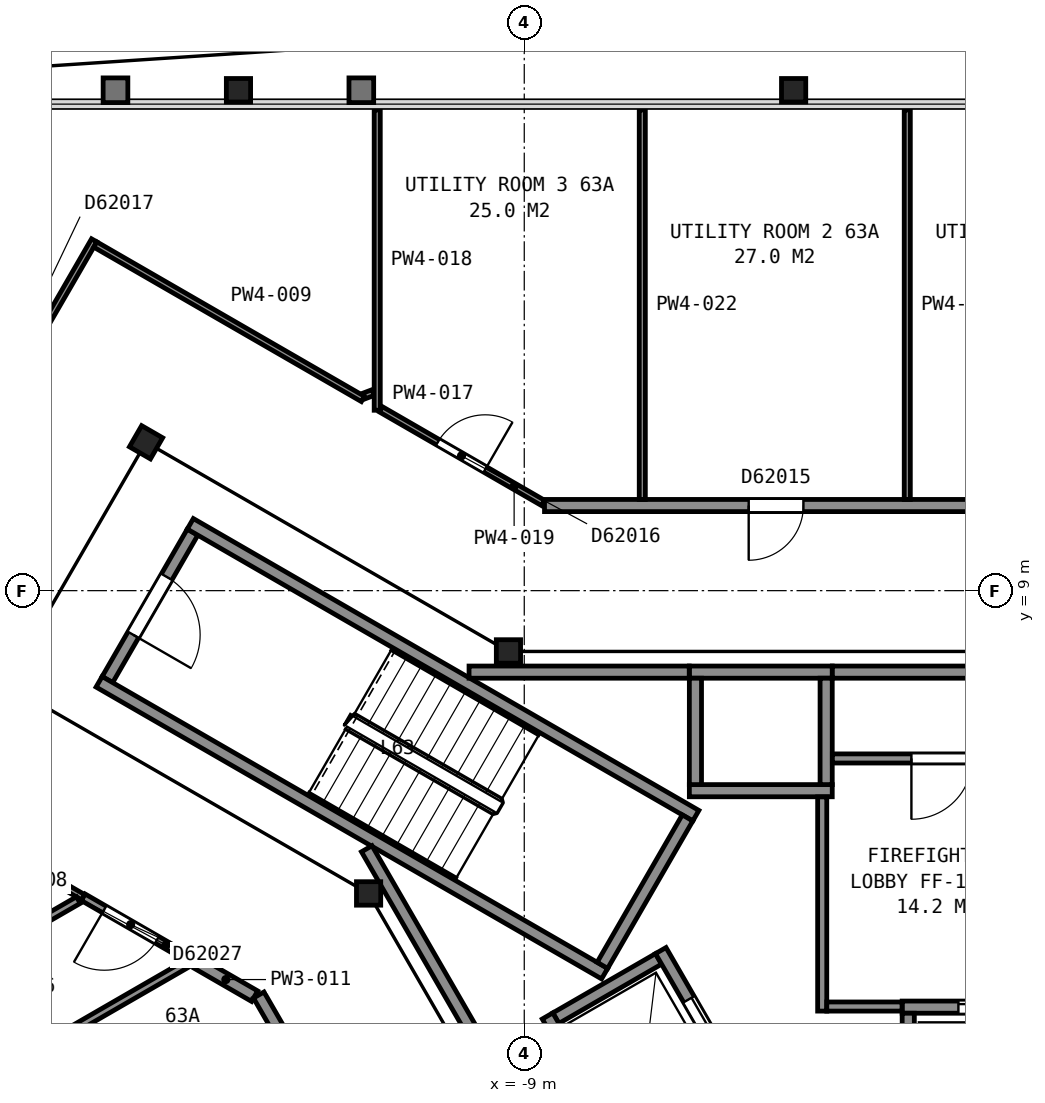
"""IFC4 building model, lengths in metres.
Left out: names, types, materials, properties, quantities, classifications, styles, units other than length and angle.
Written with IfcOpenShell. Run it as: python <this file> out.ifc"""

import sys

from ifc_helpers import new_model, si_unit, direction, frame, frame_2d, origin, origin_2d, place, context, subcontext, project, spatial, rectangle, i_section, extrude, element, fill, save


model = new_model("IFC4")
c1 = context("Model", 3, precision=1e-05, world=origin(), true_north=direction((0.0, 1.0)))
c2 = subcontext(c1, "Body", "Model", "MODEL_VIEW")
j1 = project(units=[si_unit("LENGTHUNIT", "METRE"), si_unit("PLANEANGLEUNIT", "RADIAN")], contexts=[c1])
p1 = place(None, origin())
s1 = spatial("IfcSite", under=j1, at=p1, CompositionType="ELEMENT")
p2 = place(p1, origin())
s2 = spatial("IfcBuilding", under=s1, at=p2, CompositionType="ELEMENT")
p3 = place(p2, frame((0.0, 0.0, 250.8)))
s3 = spatial("IfcBuildingStorey", under=s2, at=p3, CompositionType="ELEMENT", Elevation=250.8)
for number, where, z_axis, x_axis in (
    (1, (-4.57, 17.23, 0.0), (0.0, 0.0, 1.0), (1.0, 0.0, 0.0)),
    (2, (-13.7, 17.23, 0.0), (0.0, 0.0, 1.0), (1.0, 0.0, 0.0)),
    (3, (-9.26, 8.0, 0.0), (0.0, 0.0, 1.0), (1.0, 0.0, 0.0)),
):
    element("IfcColumn", number, at=place(p3, frame(where, z_axis=z_axis, x_axis=x_axis)), inside=s3, PredefinedType="COLUMN", context=c2, shape_type="SweptSolid", body=[
        extrude(i_section(OverallWidth=0.399, OverallDepth=0.386, WebThickness=0.021, FlangeThickness=0.033, FilletRadius=0.015, at=origin_2d()), origin(), (0.0, 0.0, 1.0), 3.7),
    ])
p4 = place(p3, frame((-15.22, 11.44, 0.0), z_axis=(0.0, 0.0, 1.0), x_axis=(0.5, 0.866025403784, 0.0)))
e4 = element("IfcColumn", 4, at=p4, inside=s3, PredefinedType="COLUMN", context=c2, shape_type="SweptSolid", body=[
    extrude(i_section(OverallWidth=0.401, OverallDepth=0.399, WebThickness=0.025, FlangeThickness=0.04, FilletRadius=0.015, at=origin_2d()), origin(), (0.0, 0.0, 1.0), 3.7),
])
p5 = place(p3, frame((-11.56, 4.02, 0.0), z_axis=(0.0, 0.0, 1.0), x_axis=(1.0, 0.0, 0.0)))
e5 = element("IfcColumn", 5, at=p5, inside=s3, PredefinedType="COLUMN", context=c2, shape_type="SweptSolid", body=[
    extrude(i_section(OverallWidth=0.399, OverallDepth=0.386, WebThickness=0.021, FlangeThickness=0.033, FilletRadius=0.015, at=origin_2d()), origin(), (0.0, 0.0, 1.0), 3.7),
])
p6 = place(p3, frame((-14.455, 9.962, 0.0), z_axis=(0.0, 0.0, 1.0), x_axis=(-0.500049511043, -0.865996816683, 0.0)))
e6 = element("IfcWall", 6, at=p6, inside=s3, PredefinedType="PARTITIONING", context=c2, shape_type="SweptSolid", body=[
    extrude(rectangle(XDim=2.8, YDim=0.2, at=frame_2d((1.4, 0.0))), origin(), (0.0, 0.0, 1.0), 3.45),
])
p7 = place(p6, frame((0.85, 0.0, 0.0)))
e7 = element("IfcOpeningElement", 7, at=p7, cuts=e6, PredefinedType="OPENING", context=c2, shape_type="SweptSolid", body=[
    extrude(rectangle(XDim=1.1, YDim=2.1, at=frame_2d((0.55, 1.05))), frame((0.0, 0.11, 0.0), z_axis=(0.0, -1.0, 0.0), x_axis=(1.0, 0.0, 0.0)), (0.0, 0.0, 1.0), 0.22),
])
for number, where, z_axis, x_axis in (
    (8, (-7.678, 2.701, 0.0), (0.0, 0.0, 1.0), (-0.866, 0.5, 0.0)),
    (9, (-6.178, 5.299, 0.0), (0.0, 0.0, 1.0), (-0.866, 0.5, 0.0)),
):
    element("IfcWall", number, at=place(p3, frame(where, z_axis=z_axis, x_axis=x_axis)), inside=s3, PredefinedType="PARTITIONING", context=c2, shape_type="SweptSolid", body=[
        extrude(rectangle(XDim=9.6, YDim=0.2, at=frame_2d((4.8, 0.0))), origin(), (0.0, 0.0, 1.0), 3.45),
    ])
p8 = place(p3, frame((-6.315, 5.262, 0.0), z_axis=(0.0, 0.0, 1.0), x_axis=(-0.500049511043, -0.865996816683, 0.0)))
e10 = element("IfcWall", 10, at=p8, inside=s3, PredefinedType="PARTITIONING", context=c2, shape_type="SweptSolid", body=[
    extrude(rectangle(XDim=2.8, YDim=0.2, at=frame_2d((1.4, 0.0))), origin(), (0.0, 0.0, 1.0), 3.45),
])
p9 = place(p3, frame((-2.785, 2.15, 0.0), z_axis=(0.0, 0.0, 1.0), x_axis=(1.0, 0.0, 0.0)))
e11 = element("IfcWall", 11, at=p9, inside=s3, PredefinedType="PARTITIONING", context=c2, shape_type="SweptSolid", body=[
    extrude(rectangle(XDim=2.95, YDim=0.2, at=frame_2d((1.475, 0.0))), origin(), (0.0, 0.0, 1.0), 3.7),
])
p10 = place(p9, frame((0.925, 0.0, 0.0)))
e12 = element("IfcOpeningElement", 12, at=p10, cuts=e11, PredefinedType="OPENING", context=c2, shape_type="SweptSolid", body=[
    extrude(rectangle(XDim=1.1, YDim=2.1, at=frame_2d((0.55, 1.05))), frame((0.0, 0.11, 0.0), z_axis=(0.0, -1.0, 0.0), x_axis=(1.0, 0.0, 0.0)), (0.0, 0.0, 1.0), 0.22),
])
for number, where, z_axis, x_axis in (
    (13, (-6.285, 5.71, 0.0), (0.0, 0.0, 1.0), (1.0, 0.0, 0.0)),
    (14, (-6.285, 7.66, 0.0), (0.0, 0.0, 1.0), (1.0, 0.0, 0.0)),
):
    element("IfcWall", number, at=place(p3, frame(where, z_axis=z_axis, x_axis=x_axis)), inside=s3, PredefinedType="PARTITIONING", context=c2, shape_type="SweptSolid", body=[
        extrude(rectangle(XDim=2.35, YDim=0.2, at=frame_2d((1.175, 0.0))), origin(), (0.0, 0.0, 1.0), 3.7),
    ])
for number, where, z_axis, x_axis in (
    (15, (-8.48, 1.969, 0.0), (0.0, 0.0, 1.0), (0.866, 0.5, 0.0)),
    (16, (-2.685, 0.1, 0.0), (0.0, 0.0, 1.0), (0.0, 1.0, 0.0)),
):
    element("IfcWall", number, at=place(p3, frame(where, z_axis=z_axis, x_axis=x_axis)), inside=s3, PredefinedType="PARTITIONING", context=c2, shape_type="SweptSolid", body=[
        extrude(rectangle(XDim=1.95, YDim=0.2, at=frame_2d((0.975, 0.0))), origin(), (0.0, 0.0, 1.0), 3.7),
    ])
for number, where, z_axis, x_axis in (
    (17, (-4.035, 5.81, 0.0), (0.0, 0.0, 1.0), (0.0, 1.0, 0.0)),
    (18, (-6.185, 5.81, 0.0), (0.0, 0.0, 1.0), (0.0, 1.0, 0.0)),
):
    element("IfcWall", number, at=place(p3, frame(where, z_axis=z_axis, x_axis=x_axis)), inside=s3, PredefinedType="PARTITIONING", context=c2, shape_type="SweptSolid", body=[
        extrude(rectangle(XDim=1.75, YDim=0.2, at=frame_2d((0.875, 0.0))), origin(), (0.0, 0.0, 1.0), 3.7),
    ])
p11 = place(p3, frame((-5.28, 0.525, 0.0), z_axis=(0.0, 0.0, 1.0), x_axis=(-0.500037662692, 0.866003658127, 0.0)))
e19 = element("IfcWall", 19, at=p11, inside=s3, PredefinedType="PARTITIONING", context=c2, shape_type="SweptSolid", body=[
    extrude(rectangle(XDim=2.95, YDim=0.2, at=frame_2d((1.475, 0.0))), origin(), (0.0, 0.0, 1.0), 3.7),
])
p12 = place(p11, frame((0.925, 0.0, 0.0)))
e20 = element("IfcOpeningElement", 20, at=p12, cuts=e19, PredefinedType="OPENING", context=c2, shape_type="SweptSolid", body=[
    extrude(rectangle(XDim=1.1, YDim=2.1, at=frame_2d((0.55, 1.05))), frame((0.0, 0.11, 0.0), z_axis=(0.0, -1.0, 0.0), x_axis=(1.0, 0.0, 0.0)), (0.0, 0.0, 1.0), 0.22),
])
p13 = place(p3, frame((-7.242, -0.376, 0.0), z_axis=(0.0, 0.0, 1.0), x_axis=(-0.499996545922, 0.866027397988, 0.0)))
e21 = element("IfcWall", 21, at=p13, inside=s3, PredefinedType="PARTITIONING", context=c2, shape_type="SweptSolid", body=[
    extrude(rectangle(XDim=2.75, YDim=0.2, at=frame_2d((1.375, 0.0))), origin(), (0.0, 0.0, 1.0), 3.7),
])
p14 = place(p3, frame((-11.591, 4.755, 0.0), z_axis=(0.0, 0.0, 1.0), x_axis=(0.500043977787, -0.866000011708, 0.0)))
e22 = element("IfcWall", 22, at=p14, inside=s3, PredefinedType="PARTITIONING", context=c2, shape_type="SweptSolid", body=[
    extrude(rectangle(XDim=6.617, YDim=0.2, at=frame_2d((3.308, 0.0))), origin(), (0.0, 0.0, 1.0), 3.45),
])
p15 = place(p14, frame((3.695, 0.0, 0.0)))
e23 = element("IfcOpeningElement", 23, at=p15, cuts=e22, PredefinedType="OPENING", context=c2, shape_type="SweptSolid", body=[
    extrude(rectangle(XDim=1.8, YDim=2.1, at=frame_2d((0.9, 1.05))), frame((0.0, 0.11, 0.0), z_axis=(0.0, -1.0, 0.0), x_axis=(1.0, 0.0, 0.0)), (0.0, 0.0, 1.0), 0.22),
])
p16 = place(p3, frame((-9.908, 7.66, 0.0), z_axis=(0.0, 0.0, 1.0), x_axis=(1.0, 0.0, 0.0)))
e24 = element("IfcWall", 24, at=p16, inside=s3, PredefinedType="PARTITIONING", context=c2, shape_type="SweptSolid", body=[
    extrude(rectangle(XDim=3.621, YDim=0.2, at=frame_2d((1.811, 0.0))), origin(), (0.0, 0.0, 1.0), 3.45),
])
p17 = place(p3, frame((-4.1, 2.085, 0.0), z_axis=(0.0, 0.0, 1.0), x_axis=(0.0, 1.0, 0.0)))
e25 = element("IfcWall", 25, at=p17, inside=s3, PredefinedType="PARTITIONING", context=c2, shape_type="SweptSolid", body=[
    extrude(rectangle(XDim=3.523, YDim=0.15, at=frame_2d((1.761, 0.0))), origin(), (0.0, 0.0, 1.0), 3.45),
])
p18 = place(p3, frame((-4.025, 2.16, 0.0), z_axis=(0.0, 0.0, 1.0), x_axis=(1.0, 0.0, 0.0)))
e26 = element("IfcWall", 26, at=p18, inside=s3, PredefinedType="PARTITIONING", context=c2, shape_type="SweptSolid", body=[
    extrude(rectangle(XDim=1.238, YDim=0.15, at=frame_2d((0.619, 0.0))), origin(), (0.0, 0.0, 1.0), 3.45),
])
p19 = place(p3, frame((-3.933, 6.24, 0.0), z_axis=(0.0, 0.0, 1.0), x_axis=(1.0, 0.0, 0.0)))
e27 = element("IfcWall", 27, at=p19, inside=s3, PredefinedType="PARTITIONING", context=c2, shape_type="SweptSolid", body=[
    extrude(rectangle(XDim=3.538, YDim=0.15, at=frame_2d((1.769, 0.0))), origin(), (0.0, 0.0, 1.0), 3.45),
])
p20 = place(p19, frame((1.3, 0.0, 0.0)))
e28 = element("IfcOpeningElement", 28, at=p20, cuts=e27, PredefinedType="OPENING", context=c2, shape_type="SweptSolid", body=[
    extrude(rectangle(XDim=1.0, YDim=2.1, at=frame_2d((0.5, 1.05))), frame((0.0, 0.085, 0.0), z_axis=(0.0, -1.0, 0.0), x_axis=(1.0, 0.0, 0.0)), (0.0, 0.0, 1.0), 0.17),
])
p21 = place(p3, frame((-3.933, 7.66, 0.0), z_axis=(0.0, 0.0, 1.0), x_axis=(1.0, 0.0, 0.0)))
e29 = element("IfcWall", 29, at=p21, inside=s3, PredefinedType="PARTITIONING", context=c2, shape_type="SweptSolid", body=[
    extrude(rectangle(XDim=13.841, YDim=0.2, at=frame_2d((6.92, 0.0))), origin(), (0.0, 0.0, 1.0), 3.45),
])
p22 = place(p3, frame((-16.253, 3.957, 0.0), z_axis=(0.0, 0.0, 1.0), x_axis=(-0.866006514596, 0.500032715607, 0.0)))
e30 = element("IfcWall", 30, at=p22, inside=s3, PredefinedType="PARTITIONING", context=c2, shape_type="SweptSolid", body=[
    extrude(rectangle(XDim=5.199, YDim=0.1, at=frame_2d((2.6, 0.0))), origin(), (0.0, 0.0, 1.0), 2.713),
])
p23 = place(p22, frame((1.978, 0.0, 0.0)))
e31 = element("IfcOpeningElement", 31, at=p23, cuts=e30, PredefinedType="OPENING", context=c2, shape_type="SweptSolid", body=[
    extrude(rectangle(XDim=0.9, YDim=2.1, at=frame_2d((0.45, 1.05))), frame((0.0, 0.06, 0.0), z_axis=(0.0, -1.0, 0.0), x_axis=(1.0, 0.0, 0.0)), (0.0, 0.0, 1.0), 0.12),
])
p24 = place(p3, frame((-20.824, 6.539, 0.0), z_axis=(0.0, 0.0, 1.0), x_axis=(0.500297300687, 0.865853689098, 0.0)))
e32 = element("IfcWall", 32, at=p24, inside=s3, PredefinedType="PARTITIONING", context=c2, shape_type="SweptSolid", body=[
    extrude(rectangle(XDim=9.496, YDim=0.1, at=frame_2d((4.748, 0.0))), origin(), (0.0, 0.0, 1.0), 2.713),
])
p25 = place(p24, frame((4.3, 0.0, 0.0)))
e33 = element("IfcOpeningElement", 33, at=p25, cuts=e32, PredefinedType="OPENING", context=c2, shape_type="SweptSolid", body=[
    extrude(rectangle(XDim=0.9, YDim=2.1, at=frame_2d((0.45, 1.05))), frame((0.0, 0.06, 0.0), z_axis=(0.0, -1.0, 0.0), x_axis=(1.0, 0.0, 0.0)), (0.0, 0.0, 1.0), 0.12),
])
p26 = place(p3, frame((-20.418, 1.553, 0.0), z_axis=(0.0, 0.0, 1.0), x_axis=(0.8660976733, 0.49987480463, 0.0)))
e34 = element("IfcWall", 34, at=p26, inside=s3, PredefinedType="PARTITIONING", context=c2, shape_type="SweptSolid", body=[
    extrude(rectangle(XDim=4.717, YDim=0.125, at=frame_2d((2.358, 0.0))), origin(), (0.0, 0.0, 1.0), 2.713),
])
p27 = place(p3, frame((-19.518, -0.006, 0.0), z_axis=(0.0, 0.0, 1.0), x_axis=(0.866072118736, 0.499919078599, 0.0)))
e35 = element("IfcWall", 35, at=p27, inside=s3, PredefinedType="PARTITIONING", context=c2, shape_type="SweptSolid", body=[
    extrude(rectangle(XDim=5.912, YDim=0.125, at=frame_2d((2.956, 0.0))), origin(), (0.0, 0.0, 1.0), 2.713),
])
p28 = place(p3, frame((-16.253, 3.957, 0.0), z_axis=(0.0, 0.0, 1.0), x_axis=(0.866173232673, -0.499743865396, 0.0)))
e36 = element("IfcWall", 36, at=p28, inside=s3, PredefinedType="PARTITIONING", context=c2, shape_type="SweptSolid", body=[
    extrude(rectangle(XDim=1.974, YDim=0.125, at=frame_2d((0.987, 0.0))), origin(), (0.0, 0.0, 1.0), 2.713),
])
p29 = place(p28, frame((0.4, 0.0, 0.0)))
e37 = element("IfcOpeningElement", 37, at=p29, cuts=e36, PredefinedType="OPENING", context=c2, shape_type="SweptSolid", body=[
    extrude(rectangle(XDim=1.0, YDim=2.1, at=frame_2d((0.5, 1.05))), frame((0.0, 0.073, 0.0), z_axis=(0.0, -1.0, 0.0), x_axis=(1.0, 0.0, 0.0)), (0.0, 0.0, 1.0), 0.145),
])
p30 = place(p3, frame((-16.055, 14.693, 0.0), z_axis=(0.0, 0.0, 1.0), x_axis=(0.866094383736, -0.499880504182, 0.0)))
e38 = element("IfcWall", 38, at=p30, inside=s3, PredefinedType="PARTITIONING", context=c2, shape_type="SweptSolid", body=[
    extrude(rectangle(XDim=5.081, YDim=0.1, at=frame_2d((2.541, 0.0))), origin(), (0.0, 0.0, 1.0), 2.713),
])
p31 = place(p3, frame((-14.381, 2.877, 0.0), z_axis=(0.0, 0.0, 1.0), x_axis=(0.866215333661, -0.499670887416, 0.0)))
e39 = element("IfcWall", 39, at=p31, inside=s3, PredefinedType="PARTITIONING", context=c2, shape_type="SweptSolid", body=[
    extrude(rectangle(XDim=1.093, YDim=0.2, at=frame_2d((0.546, 0.0))), origin(), (0.0, 0.0, 1.0), 2.713),
])
p32 = place(p3, frame((-4.675, -12.706, 0.0), z_axis=(0.0, 0.0, 1.0), x_axis=(-0.499972470324, 0.866041297467, 0.0)))
e40 = element("IfcWall", 40, at=p32, inside=s3, PredefinedType="PARTITIONING", context=c2, shape_type="SweptSolid", body=[
    extrude(rectangle(XDim=17.385, YDim=0.2, at=frame_2d((8.692, 0.0))), origin(), (0.0, 0.0, 1.0), 2.713),
])
p33 = place(p32, frame((14.57, 0.0, 0.0)))
e41 = element("IfcOpeningElement", 41, at=p33, cuts=e40, PredefinedType="OPENING", context=c2, shape_type="SweptSolid", body=[
    extrude(rectangle(XDim=0.9, YDim=2.1, at=frame_2d((0.45, 1.05))), frame((0.0, 0.11, 0.0), z_axis=(0.0, -1.0, 0.0), x_axis=(1.0, 0.0, 0.0)), (0.0, 0.0, 1.0), 0.22),
])
p34 = place(p32, frame((11.777, 0.0, 0.0)))
e42 = element("IfcOpeningElement", 42, at=p34, cuts=e40, PredefinedType="OPENING", context=c2, shape_type="SweptSolid", body=[
    extrude(rectangle(XDim=0.9, YDim=2.1, at=frame_2d((0.45, 1.05))), frame((0.0, 0.11, 0.0), z_axis=(0.0, -1.0, 0.0), x_axis=(1.0, 0.0, 0.0)), (0.0, 0.0, 1.0), 0.22),
])
p35 = place(p32, frame((5.095, 0.0, 0.0)))
e43 = element("IfcOpeningElement", 43, at=p35, cuts=e40, PredefinedType="OPENING", context=c2, shape_type="SweptSolid", body=[
    extrude(rectangle(XDim=0.9, YDim=2.1, at=frame_2d((0.45, 1.05))), frame((0.0, 0.11, 0.0), z_axis=(0.0, -1.0, 0.0), x_axis=(1.0, 0.0, 0.0)), (0.0, 0.0, 1.0), 0.22),
])
p36 = place(p3, frame((-11.632, 12.203, 0.0), z_axis=(0.0, 0.0, 1.0), x_axis=(0.934710776834, 0.355409290354, 0.0)))
e44 = element("IfcWall", 44, at=p36, inside=s3, PredefinedType="PARTITIONING", context=c2, shape_type="SweptSolid", body=[
    extrude(rectangle(XDim=0.156, YDim=0.1, at=frame_2d((0.078, 0.0))), origin(), (0.0, 0.0, 1.0), 2.713),
])
p37 = place(p3, frame((-11.418, 11.967, 0.0), z_axis=(0.0, 0.0, 1.0), x_axis=(0.0, 1.0, 0.0)))
e45 = element("IfcWall", 45, at=p37, inside=s3, PredefinedType="PARTITIONING", context=c2, shape_type="SweptSolid", body=[
    extrude(rectangle(XDim=4.939, YDim=0.1, at=frame_2d((2.469, 0.0))), origin(), (0.0, 0.0, 1.0), 2.713),
])
p38 = place(p3, frame((-11.357, 11.982, 0.0), z_axis=(0.0, 0.0, 1.0), x_axis=(0.866039032844, -0.499976393034, 0.0)))
e46 = element("IfcWall", 46, at=p38, inside=s3, PredefinedType="PARTITIONING", context=c2, shape_type="SweptSolid", body=[
    extrude(rectangle(XDim=3.079, YDim=0.1, at=frame_2d((1.54, 0.0))), origin(), (0.0, 0.0, 1.0), 2.713),
])
p39 = place(p38, frame((1.08, 0.0, 0.0)))
e47 = element("IfcOpeningElement", 47, at=p39, cuts=e46, PredefinedType="OPENING", context=c2, shape_type="SweptSolid", body=[
    extrude(rectangle(XDim=0.9, YDim=2.1, at=frame_2d((0.45, 1.05))), frame((0.0, 0.06, 0.0), z_axis=(0.0, -1.0, 0.0), x_axis=(1.0, 0.0, 0.0)), (0.0, 0.0, 1.0), 0.12),
])
p40 = place(p3, frame((-8.667, 10.4, 0.0), z_axis=(0.0, 0.0, 1.0), x_axis=(1.0, 0.0, 0.0)))
e48 = element("IfcWall", 48, at=p40, inside=s3, PredefinedType="PARTITIONING", context=c2, shape_type="SweptSolid", body=[
    extrude(rectangle(XDim=17.384, YDim=0.2, at=frame_2d((8.692, 0.0))), origin(), (0.0, 0.0, 1.0), 2.713),
])
p41 = place(p40, frame((12.425, 0.0, 0.0)))
e49 = element("IfcOpeningElement", 49, at=p41, cuts=e48, PredefinedType="OPENING", context=c2, shape_type="SweptSolid", body=[
    extrude(rectangle(XDim=0.9, YDim=2.1, at=frame_2d((0.45, 1.05))), frame((0.0, 0.11, 0.0), z_axis=(0.0, -1.0, 0.0), x_axis=(1.0, 0.0, 0.0)), (0.0, 0.0, 1.0), 0.22),
])
p42 = place(p40, frame((7.716, 0.0, 0.0)))
e50 = element("IfcOpeningElement", 50, at=p42, cuts=e48, PredefinedType="OPENING", context=c2, shape_type="SweptSolid", body=[
    extrude(rectangle(XDim=0.9, YDim=2.1, at=frame_2d((0.45, 1.05))), frame((0.0, 0.11, 0.0), z_axis=(0.0, -1.0, 0.0), x_axis=(1.0, 0.0, 0.0)), (0.0, 0.0, 1.0), 0.22),
])
p43 = place(p40, frame((3.358, 0.0, 0.0)))
e51 = element("IfcOpeningElement", 51, at=p43, cuts=e48, PredefinedType="OPENING", context=c2, shape_type="SweptSolid", body=[
    extrude(rectangle(XDim=0.9, YDim=2.1, at=frame_2d((0.45, 1.05))), frame((0.0, 0.11, 0.0), z_axis=(0.0, -1.0, 0.0), x_axis=(1.0, 0.0, 0.0)), (0.0, 0.0, 1.0), 0.22),
])
for number, where, z_axis, x_axis in (
    (52, (-7.059, 10.5, 0.0), (0.0, 0.0, 1.0), (0.0, 1.0, 0.0)),
    (53, (-2.701, 10.5, 0.0), (0.0, 0.0, 1.0), (0.0, 1.0, 0.0)),
):
    element("IfcWall", number, at=place(p3, frame(where, z_axis=z_axis, x_axis=x_axis)), inside=s3, PredefinedType="PARTITIONING", context=c2, shape_type="SweptSolid", body=[
        extrude(rectangle(XDim=6.406, YDim=0.1, at=frame_2d((3.203, 0.0))), origin(), (0.0, 0.0, 1.0), 2.713),
    ])
p44 = place(p7, origin())
e54 = element("IfcDoor", 54, at=p44, inside=s3, OperationType="SINGLE_SWING_RIGHT", PredefinedType="DOOR", context=c2, shape_type="SweptSolid", body=[
    extrude(rectangle(XDim=1.1, YDim=2.1, at=frame_2d((0.55, 1.05))), frame((0.0, 0.025, 0.0), z_axis=(0.0, -1.0, 0.0), x_axis=(1.0, 0.0, 0.0)), (0.0, 0.0, 1.0), 0.05),
])
fill(e7, e54)
p45 = place(p10, origin())
e55 = element("IfcDoor", 55, at=p45, inside=s3, OperationType="SLIDING_TO_LEFT", PredefinedType="DOOR", context=c2, shape_type="SweptSolid", body=[
    extrude(rectangle(XDim=1.1, YDim=2.1, at=frame_2d((0.55, 1.05))), frame((0.0, 0.025, 0.0), z_axis=(0.0, -1.0, 0.0), x_axis=(1.0, 0.0, 0.0)), (0.0, 0.0, 1.0), 0.05),
])
fill(e12, e55)
p46 = place(p12, origin())
e56 = element("IfcDoor", 56, at=p46, inside=s3, OperationType="SLIDING_TO_LEFT", PredefinedType="DOOR", context=c2, shape_type="SweptSolid", body=[
    extrude(rectangle(XDim=1.1, YDim=2.1, at=frame_2d((0.55, 1.05))), frame((0.0, 0.025, 0.0), z_axis=(0.0, -1.0, 0.0), x_axis=(1.0, 0.0, 0.0)), (0.0, 0.0, 1.0), 0.05),
])
fill(e20, e56)
p47 = place(p20, origin())
e57 = element("IfcDoor", 57, at=p47, inside=s3, OperationType="SINGLE_SWING_LEFT", PredefinedType="DOOR", context=c2, shape_type="SweptSolid", body=[
    extrude(rectangle(XDim=1.0, YDim=2.1, at=frame_2d((0.5, 1.05))), frame((0.0, 0.025, 0.0), z_axis=(0.0, -1.0, 0.0), x_axis=(1.0, 0.0, 0.0)), (0.0, 0.0, 1.0), 0.05),
])
fill(e28, e57)
p48 = place(p29, origin())
e58 = element("IfcDoor", 58, at=p48, inside=s3, OperationType="SINGLE_SWING_LEFT", PredefinedType="DOOR", context=c2, shape_type="SweptSolid", body=[
    extrude(rectangle(XDim=1.0, YDim=2.1, at=frame_2d((0.5, 1.05))), frame((0.0, 0.025, 0.0), z_axis=(0.0, -1.0, 0.0), x_axis=(1.0, 0.0, 0.0)), (0.0, 0.0, 1.0), 0.05),
])
fill(e37, e58)
p49 = place(p39, origin())
e59 = element("IfcDoor", 59, at=p49, inside=s3, OperationType="SINGLE_SWING_RIGHT", PredefinedType="DOOR", context=c2, shape_type="SweptSolid", body=[
    extrude(rectangle(XDim=0.9, YDim=2.1, at=frame_2d((0.45, 1.05))), frame((0.0, 0.025, 0.0), z_axis=(0.0, -1.0, 0.0), x_axis=(1.0, 0.0, 0.0)), (0.0, 0.0, 1.0), 0.05),
])
fill(e47, e59)
p50 = place(p43, origin())
e60 = element("IfcDoor", 60, at=p50, inside=s3, OperationType="SINGLE_SWING_LEFT", PredefinedType="DOOR", context=c2, shape_type="SweptSolid", body=[
    extrude(rectangle(XDim=0.9, YDim=2.1, at=frame_2d((0.45, 1.05))), frame((0.0, 0.025, 0.0), z_axis=(0.0, -1.0, 0.0), x_axis=(1.0, 0.0, 0.0)), (0.0, 0.0, 1.0), 0.05),
])
fill(e51, e60)
save(model, sys.argv[1])
